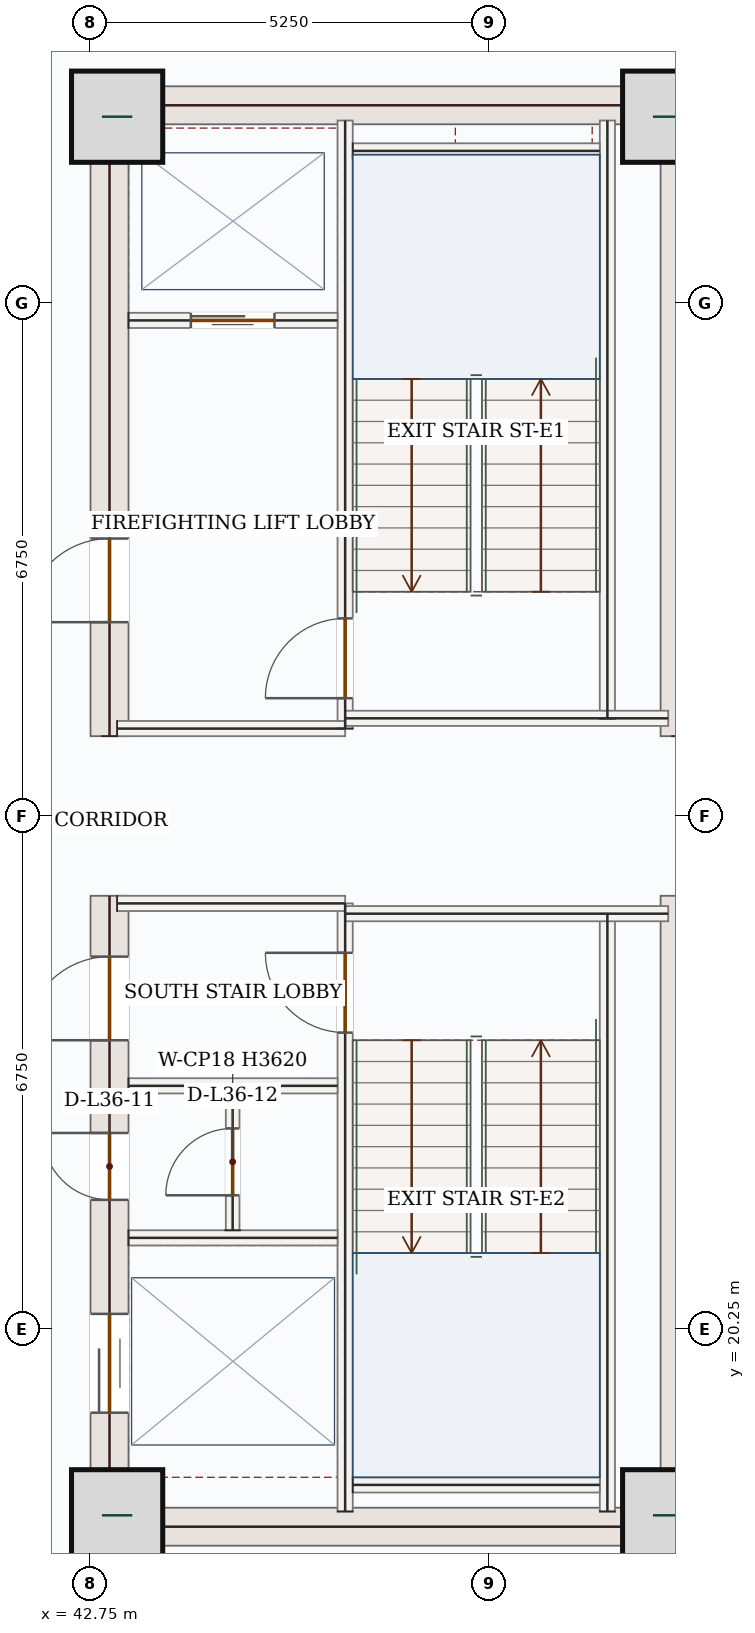
"""IFC4 building model, lengths in metres.
Left out: names, types, materials, properties, quantities, classifications, styles, units other than length and angle.
Written with IfcOpenShell. Run it as: python <this file> out.ifc"""

import sys

from ifc_helpers import new_model, si_unit, direction, frame, frame_2d, origin, origin_2d, place, context, subcontext, project, spatial, rectangle, extrude, source, transform, mapped, element, fill, save


model = new_model("IFC4")
c1 = context("Model", 3, precision=1e-05, world=origin(), true_north=direction((0.0, 1.0)))
c2 = subcontext(c1, "Body", "Model", "MODEL_VIEW")
j1 = project(units=[si_unit("LENGTHUNIT", "METRE"), si_unit("PLANEANGLEUNIT", "RADIAN")], contexts=[c1])
p1 = place(None, origin())
s1 = spatial("IfcSite", under=j1, at=p1, CompositionType="ELEMENT")
p2 = place(p1, origin())
s2 = spatial("IfcBuilding", under=s1, at=p2, CompositionType="ELEMENT")
p3 = place(p2, frame((0.0, 0.0, 159.0)))
s3 = spatial("IfcBuildingStorey", under=s2, at=p3, CompositionType="ELEMENT", Elevation=159.0)
p4 = place(p3, frame((43.0, 17.4, 0.0), z_axis=(0.0, 0.0, 1.0), x_axis=(0.0, 1.0, 0.0)))
e1 = element("IfcWall", 1, at=p4, inside=s3, PredefinedType="SHEAR", context=c2, shape_type="SweptSolid", body=[
    extrude(rectangle(XDim=8.55, YDim=0.5, at=frame_2d((4.275, 0.0))), origin(), (0.0, 0.0, 1.0), 3.62),
])
p5 = place(p4, frame((6.65, 0.0, 0.0)))
e2 = element("IfcOpeningElement", 2, at=p5, cuts=e1, PredefinedType="OPENING", context=c2, shape_type="SweptSolid", body=[
    extrude(rectangle(XDim=1.1, YDim=2.2, at=frame_2d((0.55, 1.1))), frame((0.0, 0.26, 0.0), z_axis=(0.0, -1.0, 0.0), x_axis=(1.0, 0.0, 0.0)), (0.0, 0.0, 1.0), 0.52),
])
p6 = place(p4, frame((1.75, 0.0, 0.0)))
e3 = element("IfcOpeningElement", 3, at=p6, cuts=e1, PredefinedType="OPENING", context=c2, shape_type="SweptSolid", body=[
    extrude(rectangle(XDim=1.3, YDim=2.2, at=frame_2d((0.65, 1.1))), frame((0.0, 0.26, 0.0), z_axis=(0.0, -1.0, 0.0), x_axis=(1.0, 0.0, 0.0)), (0.0, 0.0, 1.0), 0.52),
])
p7 = place(p4, frame((4.55, 0.0, 0.0)))
e4 = element("IfcOpeningElement", 4, at=p7, cuts=e1, PredefinedType="OPENING", context=c2, shape_type="SweptSolid", body=[
    extrude(rectangle(XDim=0.88, YDim=2.1, at=frame_2d((0.44, 1.05))), frame((0.0, 0.26, 0.0), z_axis=(0.0, -1.0, 0.0), x_axis=(1.0, 0.0, 0.0)), (0.0, 0.0, 1.0), 0.52),
])
p8 = place(p3, frame((43.0, 28.05, 0.0), z_axis=(0.0, 0.0, 1.0), x_axis=(0.0, 1.0, 0.0)))
e5 = element("IfcWall", 5, at=p8, inside=s3, PredefinedType="SHEAR", context=c2, shape_type="SweptSolid", body=[
    extrude(rectangle(XDim=8.55, YDim=0.5, at=frame_2d((4.275, 0.0))), origin(), (0.0, 0.0, 1.0), 3.62),
])
p9 = place(p8, frame((1.5, 0.0, 0.0)))
e6 = element("IfcOpeningElement", 6, at=p9, cuts=e5, PredefinedType="OPENING", context=c2, shape_type="SweptSolid", body=[
    extrude(rectangle(XDim=1.1, YDim=2.2, at=frame_2d((0.55, 1.1))), frame((0.0, 0.26, 0.0), z_axis=(0.0, -1.0, 0.0), x_axis=(1.0, 0.0, 0.0)), (0.0, 0.0, 1.0), 0.52),
])
m1 = source(origin(), c2, "Body", "SweptSolid", [
    extrude(rectangle(XDim=8.55, YDim=0.5, at=frame_2d((4.275, 0.0))), origin(), (0.0, 0.0, 1.0), 3.62),
])
for number, where, z_axis, x_axis in (
    (7, (50.5, 17.4, 0.0), (0.0, 0.0, 1.0), (0.0, 1.0, 0.0)),
    (8, (50.5, 28.05, 0.0), (0.0, 0.0, 1.0), (0.0, 1.0, 0.0)),
):
    element("IfcWall", number, at=place(p3, frame(where, z_axis=z_axis, x_axis=x_axis)), inside=s3, PredefinedType="SHEAR", context=c2, shape_type="MappedRepresentation", body=[
        mapped(m1, transform((0.0, 0.0, 0.0), x_axis=(1.0, 0.0, 0.0), y_axis=(0.0, 1.0, 0.0), z_axis=(0.0, 0.0, 1.0), scale=1.0)),
    ])
m2 = source(origin(), c2, "Body", "SweptSolid", [
    extrude(rectangle(XDim=7.0, YDim=0.5, at=frame_2d((3.5, 0.0))), origin(), (0.0, 0.0, 1.0), 3.62),
])
for number, where, z_axis, x_axis in (
    (9, (43.25, 17.65, 0.0), (0.0, 0.0, 1.0), (1.0, 0.0, 0.0)),
    (10, (43.25, 36.35, 0.0), (0.0, 0.0, 1.0), (1.0, 0.0, 0.0)),
):
    element("IfcWall", number, at=place(p3, frame(where, z_axis=z_axis, x_axis=x_axis)), inside=s3, PredefinedType="SHEAR", context=c2, shape_type="MappedRepresentation", body=[
        mapped(m2, transform((0.0, 0.0, 0.0), x_axis=(1.0, 0.0, 0.0), y_axis=(0.0, 1.0, 0.0), z_axis=(0.0, 0.0, 1.0), scale=1.0)),
    ])
m3 = source(origin(), c2, "Body", "SweptSolid", [
    extrude(rectangle(XDim=1.2, YDim=1.2, at=origin_2d()), origin(), (0.0, 0.0, 1.0), 3.9),
])
for number, where, z_axis, x_axis in (
    (11, (43.1, 17.8, 0.0), (0.0, 0.0, 1.0), (1.0, 0.0, 0.0)),
    (12, (50.35, 17.8, 0.0), (0.0, 0.0, 1.0), (1.0, 0.0, 0.0)),
    (13, (43.1, 36.2, 0.0), (0.0, 0.0, 1.0), (1.0, 0.0, 0.0)),
    (14, (50.35, 36.2, 0.0), (0.0, 0.0, 1.0), (1.0, 0.0, 0.0)),
):
    element("IfcColumn", number, at=place(p3, frame(where, z_axis=z_axis, x_axis=x_axis)), inside=s3, PredefinedType="COLUMN", context=c2, shape_type="MappedRepresentation", body=[
        mapped(m3, transform((0.0, 0.0, 0.0), x_axis=(1.0, 0.0, 0.0), y_axis=(0.0, 1.0, 0.0), z_axis=(0.0, 0.0, 1.0), scale=1.0)),
    ])
m4 = source(origin(), c2, "Body", "SweptSolid", [
    extrude(rectangle(XDim=5.258, YDim=0.28, at=frame_2d((2.629, 0.0))), origin(), (0.0, 0.0, 1.0), 3.62),
])
p10 = place(p3, frame((53.06, 18.458, 0.0), z_axis=(0.0, 0.0, 1.0), x_axis=(-0.707106781187, -0.707106781187, 0.0)))
e15 = element("IfcWall", 15, at=p10, inside=s3, PredefinedType="SOLIDWALL", context=c2, shape_type="MappedRepresentation", body=[
    mapped(m4, transform((0.0, 0.0, 0.0), x_axis=(1.0, 0.0, 0.0), y_axis=(0.0, 1.0, 0.0), z_axis=(0.0, 0.0, 1.0), scale=1.0)),
])
m5 = source(origin(), c2, "Body", "SweptSolid", [
    extrude(rectangle(XDim=3.129, YDim=0.28, at=frame_2d((1.565, 0.0))), origin(), (0.0, 0.0, 1.0), 3.62),
])
p11 = place(p3, frame((49.342, 39.26, 0.0), z_axis=(0.0, 0.0, 1.0), x_axis=(0.707067771627, -0.707145788594, 0.0)))
e16 = element("IfcWall", 16, at=p11, inside=s3, PredefinedType="SOLIDWALL", context=c2, shape_type="MappedRepresentation", body=[
    mapped(m5, transform((0.0, 0.0, 0.0), x_axis=(1.0, 0.0, 0.0), y_axis=(0.0, 1.0, 0.0), z_axis=(0.0, 0.0, 1.0), scale=1.0)),
])
m6 = source(origin(), c2, "Body", "SweptSolid", [
    extrude(rectangle(XDim=7.87, YDim=0.2, at=frame_2d((3.935, 0.0))), origin(), (0.0, 0.0, 1.0), 3.62),
])
for number, where, z_axis, x_axis in (
    (17, (49.55, 17.85, 0.0), (0.0, 0.0, 1.0), (0.0, 1.0, 0.0)),
    (18, (49.55, 28.28, 0.0), (0.0, 0.0, 1.0), (0.0, 1.0, 0.0)),
):
    element("IfcWall", number, at=place(p3, frame(where, z_axis=z_axis, x_axis=x_axis)), inside=s3, PredefinedType="SOLIDWALL", context=c2, shape_type="MappedRepresentation", body=[
        mapped(m6, transform((0.0, 0.0, 0.0), x_axis=(1.0, 0.0, 0.0), y_axis=(0.0, 1.0, 0.0), z_axis=(0.0, 0.0, 1.0), scale=1.0)),
    ])
p12 = place(p3, frame((46.1, 17.85, 0.0), z_axis=(0.0, 0.0, 1.0), x_axis=(0.0, 1.0, 0.0)))
e19 = element("IfcWall", 19, at=p12, inside=s3, PredefinedType="SOLIDWALL", context=c2, shape_type="SweptSolid", body=[
    extrude(rectangle(XDim=8.0, YDim=0.2, at=frame_2d((4.0, 0.0))), origin(), (0.0, 0.0, 1.0), 3.62),
])
p13 = place(p12, frame((6.3, 0.0, 0.0)))
e20 = element("IfcOpeningElement", 20, at=p13, cuts=e19, PredefinedType="OPENING", context=c2, shape_type="SweptSolid", body=[
    extrude(rectangle(XDim=1.05, YDim=2.15, at=frame_2d((0.525, 1.075))), frame((0.0, 0.11, 0.0), z_axis=(0.0, -1.0, 0.0), x_axis=(1.0, 0.0, 0.0)), (0.0, 0.0, 1.0), 0.22),
])
p14 = place(p3, frame((46.1, 28.15, 0.0), z_axis=(0.0, 0.0, 1.0), x_axis=(0.0, 1.0, 0.0)))
e21 = element("IfcWall", 21, at=p14, inside=s3, PredefinedType="SOLIDWALL", context=c2, shape_type="SweptSolid", body=[
    extrude(rectangle(XDim=8.0, YDim=0.2, at=frame_2d((4.0, 0.0))), origin(), (0.0, 0.0, 1.0), 3.62),
])
p15 = place(p14, frame((0.4, 0.0, 0.0)))
e22 = element("IfcOpeningElement", 22, at=p15, cuts=e21, PredefinedType="OPENING", context=c2, shape_type="SweptSolid", body=[
    extrude(rectangle(XDim=1.05, YDim=2.15, at=frame_2d((0.525, 1.075))), frame((0.0, 0.11, 0.0), z_axis=(0.0, -1.0, 0.0), x_axis=(1.0, 0.0, 0.0)), (0.0, 0.0, 1.0), 0.22),
])
m7 = source(origin(), c2, "Body", "SweptSolid", [
    extrude(rectangle(XDim=3.0, YDim=0.2, at=frame_2d((1.5, 0.0))), origin(), (0.0, 0.0, 1.0), 3.62),
])
p16 = place(p3, frame((43.1, 25.85, 0.0), z_axis=(0.0, 0.0, 1.0), x_axis=(1.0, 0.0, 0.0)))
e23 = element("IfcWall", 23, at=p16, inside=s3, PredefinedType="SOLIDWALL", context=c2, shape_type="MappedRepresentation", body=[
    mapped(m7, transform((0.0, 0.0, 0.0), x_axis=(1.0, 0.0, 0.0), y_axis=(0.0, 1.0, 0.0), z_axis=(0.0, 0.0, 1.0), scale=1.0)),
])
m8 = source(origin(), c2, "Body", "SweptSolid", [
    extrude(rectangle(XDim=4.25, YDim=0.2, at=frame_2d((2.125, 0.0))), origin(), (0.0, 0.0, 1.0), 3.62),
])
p17 = place(p3, frame((46.1, 25.715, 0.0), z_axis=(0.0, 0.0, 1.0), x_axis=(1.0, 0.0, 0.0)))
e24 = element("IfcWall", 24, at=p17, inside=s3, PredefinedType="SOLIDWALL", context=c2, shape_type="MappedRepresentation", body=[
    mapped(m8, transform((0.0, 0.0, 0.0), x_axis=(1.0, 0.0, 0.0), y_axis=(0.0, 1.0, 0.0), z_axis=(0.0, 0.0, 1.0), scale=1.0)),
])
p18 = place(p3, frame((43.1, 28.15, 0.0), z_axis=(0.0, 0.0, 1.0), x_axis=(1.0, 0.0, 0.0)))
e25 = element("IfcWall", 25, at=p18, inside=s3, PredefinedType="SOLIDWALL", context=c2, shape_type="MappedRepresentation", body=[
    mapped(m7, transform((0.0, 0.0, 0.0), x_axis=(1.0, 0.0, 0.0), y_axis=(0.0, 1.0, 0.0), z_axis=(0.0, 0.0, 1.0), scale=1.0)),
])
p19 = place(p3, frame((46.1, 28.285, 0.0), z_axis=(0.0, 0.0, 1.0), x_axis=(1.0, 0.0, 0.0)))
e26 = element("IfcWall", 26, at=p19, inside=s3, PredefinedType="SOLIDWALL", context=c2, shape_type="MappedRepresentation", body=[
    mapped(m8, transform((0.0, 0.0, 0.0), x_axis=(1.0, 0.0, 0.0), y_axis=(0.0, 1.0, 0.0), z_axis=(0.0, 0.0, 1.0), scale=1.0)),
])
m9 = source(origin(), c2, "Body", "SweptSolid", [
    extrude(rectangle(XDim=3.25, YDim=0.2, at=frame_2d((1.625, 0.0))), origin(), (0.0, 0.0, 1.0), 3.62),
])
for number, where, z_axis, x_axis in (
    (27, (46.2, 35.75, 0.0), (0.0, 0.0, 1.0), (1.0, 0.0, 0.0)),
    (28, (46.2, 18.2, 0.0), (0.0, 0.0, 1.0), (1.0, 0.0, 0.0)),
):
    element("IfcWall", number, at=place(p3, frame(where, z_axis=z_axis, x_axis=x_axis)), inside=s3, PredefinedType="SOLIDWALL", context=c2, shape_type="MappedRepresentation", body=[
        mapped(m9, transform((0.0, 0.0, 0.0), x_axis=(1.0, 0.0, 0.0), y_axis=(0.0, 1.0, 0.0), z_axis=(0.0, 0.0, 1.0), scale=1.0)),
    ])
p20 = place(p3, frame((43.25, 33.52, 0.0), z_axis=(0.0, 0.0, 1.0), x_axis=(1.0, 0.0, 0.0)))
e29 = element("IfcWall", 29, at=p20, inside=s3, PredefinedType="SOLIDWALL", context=c2, shape_type="SweptSolid", body=[
    extrude(rectangle(XDim=2.75, YDim=0.2, at=frame_2d((1.375, 0.0))), origin(), (0.0, 0.0, 1.0), 3.62),
])
p21 = place(p20, frame((0.82, 0.0, 0.0)))
e30 = element("IfcOpeningElement", 30, at=p21, cuts=e29, PredefinedType="OPENING", context=c2, shape_type="SweptSolid", body=[
    extrude(rectangle(XDim=1.1, YDim=2.15, at=frame_2d((0.55, 1.075))), frame((0.0, 0.11, 0.0), z_axis=(0.0, -1.0, 0.0), x_axis=(1.0, 0.0, 0.0)), (0.0, 0.0, 1.0), 0.22),
])
m10 = source(origin(), c2, "Body", "SweptSolid", [
    extrude(rectangle(XDim=2.75, YDim=0.2, at=frame_2d((1.375, 0.0))), origin(), (0.0, 0.0, 1.0), 3.62),
])
for number, where, z_axis, x_axis in (
    (31, (43.25, 23.45, 0.0), (0.0, 0.0, 1.0), (1.0, 0.0, 0.0)),
    (32, (43.25, 21.45, 0.0), (0.0, 0.0, 1.0), (1.0, 0.0, 0.0)),
):
    element("IfcWall", number, at=place(p3, frame(where, z_axis=z_axis, x_axis=x_axis)), inside=s3, PredefinedType="SOLIDWALL", context=c2, shape_type="MappedRepresentation", body=[
        mapped(m10, transform((0.0, 0.0, 0.0), x_axis=(1.0, 0.0, 0.0), y_axis=(0.0, 1.0, 0.0), z_axis=(0.0, 0.0, 1.0), scale=1.0)),
    ])
p22 = place(p3, frame((44.62, 21.55, 0.0), z_axis=(0.0, 0.0, 1.0), x_axis=(0.0, 1.0, 0.0)))
e33 = element("IfcWall", 33, at=p22, inside=s3, PredefinedType="PARTITIONING", context=c2, shape_type="SweptSolid", body=[
    extrude(rectangle(XDim=1.8, YDim=0.18, at=frame_2d((0.9, 0.0))), origin(), (0.0, 0.0, 1.0), 3.62),
])
p23 = place(p22, frame((0.46, 0.0, 0.0)))
e34 = element("IfcOpeningElement", 34, at=p23, cuts=e33, PredefinedType="OPENING", context=c2, shape_type="SweptSolid", body=[
    extrude(rectangle(XDim=0.88, YDim=2.1, at=frame_2d((0.44, 1.05))), frame((0.0, 0.1, 0.0), z_axis=(0.0, -1.0, 0.0), x_axis=(1.0, 0.0, 0.0)), (0.0, 0.0, 1.0), 0.2),
])
m11 = source(origin(), c2, "Body", "SweptSolid", [
    extrude(rectangle(XDim=1.05, YDim=2.15, at=frame_2d((0.525, 1.075))), frame((0.0, 0.025, 0.0), z_axis=(0.0, -1.0, 0.0), x_axis=(1.0, 0.0, 0.0)), (0.0, 0.0, 1.0), 0.05),
])
p24 = place(p15, origin())
e35 = element("IfcDoor", 35, at=p24, inside=s3, OperationType="SINGLE_SWING_LEFT", PredefinedType="DOOR", context=c2, shape_type="MappedRepresentation", body=[
    mapped(m11, transform((0.0, 0.0, 0.0), x_axis=(1.0, 0.0, 0.0), y_axis=(0.0, 1.0, 0.0), z_axis=(0.0, 0.0, 1.0), scale=1.0)),
])
fill(e22, e35)
p25 = place(p13, origin())
e36 = element("IfcDoor", 36, at=p25, inside=s3, OperationType="SINGLE_SWING_RIGHT", PredefinedType="DOOR", context=c2, shape_type="MappedRepresentation", body=[
    mapped(m11, transform((0.0, 0.0, 0.0), x_axis=(1.0, 0.0, 0.0), y_axis=(0.0, 1.0, 0.0), z_axis=(0.0, 0.0, 1.0), scale=1.0)),
])
fill(e20, e36)
m12 = source(origin(), c2, "Body", "SweptSolid", [
    extrude(rectangle(XDim=1.1, YDim=2.15, at=frame_2d((0.55, 1.075))), frame((0.0, 0.025, 0.0), z_axis=(0.0, -1.0, 0.0), x_axis=(1.0, 0.0, 0.0)), (0.0, 0.0, 1.0), 0.05),
])
p26 = place(p21, origin())
e37 = element("IfcDoor", 37, at=p26, inside=s3, OperationType="DOUBLE_DOOR_SLIDING", PredefinedType="DOOR", context=c2, shape_type="MappedRepresentation", body=[
    mapped(m12, transform((0.0, 0.0, 0.0), x_axis=(1.0, 0.0, 0.0), y_axis=(0.0, 1.0, 0.0), z_axis=(0.0, 0.0, 1.0), scale=1.0)),
])
fill(e30, e37)
m13 = source(origin(), c2, "Body", "SweptSolid", [
    extrude(rectangle(XDim=1.1, YDim=2.2, at=frame_2d((0.55, 1.1))), frame((0.0, 0.025, 0.0), z_axis=(0.0, -1.0, 0.0), x_axis=(1.0, 0.0, 0.0)), (0.0, 0.0, 1.0), 0.05),
])
p27 = place(p9, origin())
e38 = element("IfcDoor", 38, at=p27, inside=s3, OperationType="SINGLE_SWING_LEFT", PredefinedType="DOOR", context=c2, shape_type="MappedRepresentation", body=[
    mapped(m13, transform((0.0, 0.0, 0.0), x_axis=(1.0, 0.0, 0.0), y_axis=(0.0, 1.0, 0.0), z_axis=(0.0, 0.0, 1.0), scale=1.0)),
])
fill(e6, e38)
p28 = place(p5, origin())
e39 = element("IfcDoor", 39, at=p28, inside=s3, OperationType="SINGLE_SWING_LEFT", PredefinedType="DOOR", context=c2, shape_type="MappedRepresentation", body=[
    mapped(m13, transform((0.0, 0.0, 0.0), x_axis=(1.0, 0.0, 0.0), y_axis=(0.0, 1.0, 0.0), z_axis=(0.0, 0.0, 1.0), scale=1.0)),
])
fill(e2, e39)
m14 = source(origin(), c2, "Body", "SweptSolid", [
    extrude(rectangle(XDim=1.3, YDim=2.2, at=frame_2d((0.65, 1.1))), frame((0.0, 0.025, 0.0), z_axis=(0.0, -1.0, 0.0), x_axis=(1.0, 0.0, 0.0)), (0.0, 0.0, 1.0), 0.05),
])
p29 = place(p6, origin())
e40 = element("IfcDoor", 40, at=p29, inside=s3, OperationType="DOUBLE_DOOR_SLIDING", PredefinedType="DOOR", context=c2, shape_type="MappedRepresentation", body=[
    mapped(m14, transform((0.0, 0.0, 0.0), x_axis=(1.0, 0.0, 0.0), y_axis=(0.0, 1.0, 0.0), z_axis=(0.0, 0.0, 1.0), scale=1.0)),
])
fill(e3, e40)
m15 = source(origin(), c2, "Body", "SweptSolid", [
    extrude(rectangle(XDim=0.88, YDim=2.1, at=frame_2d((0.44, 1.05))), frame((0.0, 0.025, 0.0), z_axis=(0.0, -1.0, 0.0), x_axis=(1.0, 0.0, 0.0)), (0.0, 0.0, 1.0), 0.05),
])
p30 = place(p7, origin())
e41 = element("IfcDoor", 41, at=p30, inside=s3, OperationType="SINGLE_SWING_RIGHT", PredefinedType="DOOR", context=c2, shape_type="MappedRepresentation", body=[
    mapped(m15, transform((0.0, 0.0, 0.0), x_axis=(1.0, 0.0, 0.0), y_axis=(0.0, 1.0, 0.0), z_axis=(0.0, 0.0, 1.0), scale=1.0)),
])
fill(e4, e41)
p31 = place(p23, origin())
e42 = element("IfcDoor", 42, at=p31, inside=s3, OperationType="SINGLE_SWING_LEFT", PredefinedType="DOOR", context=c2, shape_type="MappedRepresentation", body=[
    mapped(m15, transform((0.0, 0.0, 0.0), x_axis=(1.0, 0.0, 0.0), y_axis=(0.0, 1.0, 0.0), z_axis=(0.0, 0.0, 1.0), scale=1.0)),
])
fill(e34, e42)
save(model, sys.argv[1])
